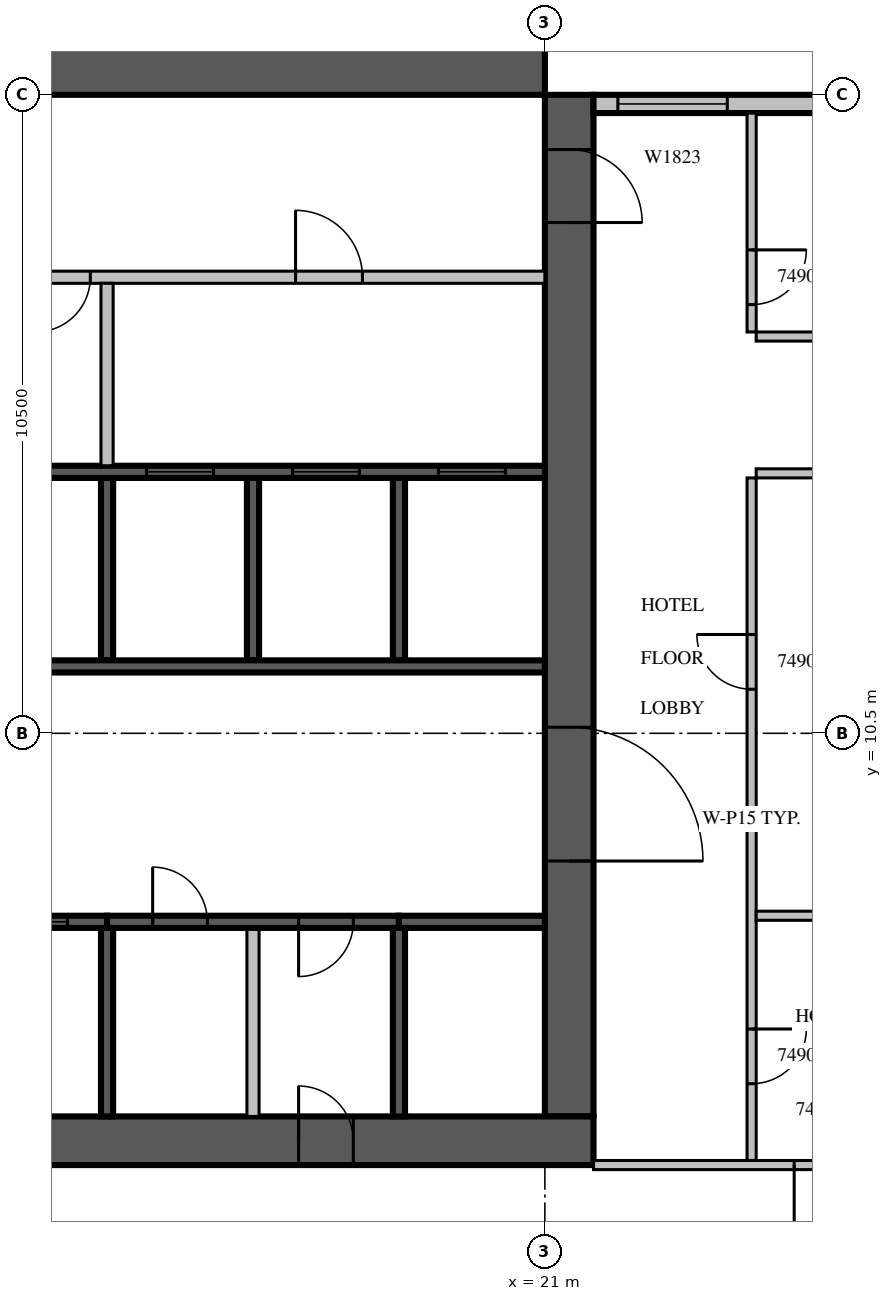
"""IFC4 building model, lengths in metres.
Left out: names, types, materials, properties, quantities, classifications, styles, units other than length and angle.
Written with IfcOpenShell. Run it as: python <this file> out.ifc"""

import sys

from ifc_helpers import new_model, si_unit, direction, frame, frame_2d, origin, place, context, subcontext, project, spatial, rectangle, extrude, source, transform, mapped, element, fill, save


model = new_model("IFC4")
c1 = context("Model", 3, precision=1e-05, world=origin(), true_north=direction((0.0, 1.0)))
c2 = subcontext(c1, "Body", "Model", "MODEL_VIEW")
j1 = project(units=[si_unit("LENGTHUNIT", "METRE"), si_unit("PLANEANGLEUNIT", "RADIAN")], contexts=[c1])
p1 = place(None, origin())
s1 = spatial("IfcSite", under=j1, at=p1, CompositionType="ELEMENT")
p2 = place(p1, origin())
s2 = spatial("IfcBuilding", under=s1, at=p2, CompositionType="ELEMENT")
p3 = place(p2, frame((0.0, 0.0, 219.6)))
s3 = spatial("IfcBuildingStorey", under=s2, at=p3, CompositionType="ELEMENT", Elevation=219.6)
m1 = source(origin(), c2, "Body", "SweptSolid", [
    extrude(rectangle(XDim=16.8, YDim=0.8, at=frame_2d((8.4, 0.0))), origin(), (0.0, 0.0, 1.0), 3.8),
])
p4 = place(p3, frame((21.4, 4.2, 0.0), z_axis=(0.0, 0.0, 1.0), x_axis=(0.0, 1.0, 0.0)))
e1 = element("IfcWall", 1, at=p4, inside=s3, PredefinedType="SHEAR", context=c2, shape_type="MappedRepresentation", body=[
    mapped(m1, transform((0.0, 0.0, 0.0), scale=1.0)),
])
m2 = source(origin(), c2, "Body", "SweptSolid", [
    extrude(rectangle(XDim=2.2, YDim=2.1, at=frame_2d((1.1, 1.05))), frame((0.0, 0.41, 0.0), z_axis=(0.0, -1.0, 0.0), x_axis=(1.0, 0.0, 0.0)), (0.0, 0.0, 1.0), 0.82),
])
p5 = place(p4, frame((4.2, 0.0, 0.0)))
e2 = element("IfcOpeningElement", 2, at=p5, cuts=e1, PredefinedType="OPENING", context=c2, shape_type="MappedRepresentation", body=[
    mapped(m2, transform((0.0, 0.0, 0.0), scale=1.0)),
])
m3 = source(origin(), c2, "Body", "SweptSolid", [
    extrude(rectangle(XDim=1.2, YDim=2.1, at=frame_2d((0.6, 1.05))), frame((0.0, 0.41, 0.0), z_axis=(0.0, -1.0, 0.0), x_axis=(1.0, 0.0, 0.0)), (0.0, 0.0, 1.0), 0.82),
])
p6 = place(p4, frame((14.7, 0.0, 0.0)))
e3 = element("IfcOpeningElement", 3, at=p6, cuts=e1, PredefinedType="OPENING", context=c2, shape_type="MappedRepresentation", body=[
    mapped(m3, transform((0.0, 0.0, 0.0), scale=1.0)),
])
m4 = source(origin(), c2, "Body", "SweptSolid", [
    extrude(rectangle(XDim=17.6, YDim=0.8, at=frame_2d((8.8, 0.0))), origin(), (0.0, 0.0, 1.0), 3.8),
])
p7 = place(p3, frame((4.2, 3.8, 0.0), z_axis=(0.0, 0.0, 1.0), x_axis=(1.0, 0.0, 0.0)))
e4 = element("IfcWall", 4, at=p7, inside=s3, PredefinedType="SHEAR", context=c2, shape_type="MappedRepresentation", body=[
    mapped(m4, transform((0.0, 0.0, 0.0), scale=1.0)),
])
m5 = source(origin(), c2, "Body", "SweptSolid", [
    extrude(rectangle(XDim=0.9, YDim=2.1, at=frame_2d((0.45, 1.05))), frame((0.0, 0.41, 0.0), z_axis=(0.0, -1.0, 0.0), x_axis=(1.0, 0.0, 0.0)), (0.0, 0.0, 1.0), 0.82),
])
p8 = place(p7, frame((12.75, 0.0, 0.0)))
e5 = element("IfcOpeningElement", 5, at=p8, cuts=e4, PredefinedType="OPENING", context=c2, shape_type="MappedRepresentation", body=[
    mapped(m5, transform((0.0, 0.0, 0.0), scale=1.0)),
])
p9 = place(p3, frame((4.2, 21.4, 0.0), z_axis=(0.0, 0.0, 1.0), x_axis=(1.0, 0.0, 0.0)))
e6 = element("IfcWall", 6, at=p9, inside=s3, PredefinedType="SHEAR", context=c2, shape_type="MappedRepresentation", body=[
    mapped(m1, transform((0.0, 0.0, 0.0), scale=1.0)),
])
p10 = place(p9, frame((6.2, 0.0, 0.0)))
e7 = element("IfcOpeningElement", 7, at=p10, cuts=e6, PredefinedType="OPENING", context=c2, shape_type="MappedRepresentation", body=[
    mapped(m3, transform((0.0, 0.0, 0.0), scale=1.0)),
])
m6 = source(origin(), c2, "Body", "SweptSolid", [
    extrude(rectangle(XDim=7.15, YDim=0.3, at=frame_2d((3.575, 0.0))), origin(), (0.0, 0.0, 1.0), 3.4),
])
p11 = place(p3, frame((28.95, 20.85, 0.0), z_axis=(0.0, 0.0, 1.0), x_axis=(-1.0, 0.0, 0.0)))
e8 = element("IfcWall", 8, at=p11, inside=s3, PredefinedType="STANDARD", context=c2, shape_type="MappedRepresentation", body=[
    mapped(m6, transform((0.0, 0.0, 0.0), scale=1.0)),
])
m7 = source(origin(), c2, "Body", "SweptSolid", [
    extrude(rectangle(XDim=3.0, YDim=2.3, at=frame_2d((1.5, 1.15))), frame((0.0, 0.16, 0.0), z_axis=(0.0, -1.0, 0.0), x_axis=(1.0, 0.0, 0.0)), (0.0, 0.0, 1.0), 0.32),
])
p12 = place(p11, frame((0.15, 0.0, 0.6)))
e9 = element("IfcOpeningElement", 9, at=p12, cuts=e8, PredefinedType="OPENING", context=c2, shape_type="MappedRepresentation", body=[
    mapped(m7, transform((0.0, 0.0, 0.0), scale=1.0)),
])
m8 = source(origin(), c2, "Body", "SweptSolid", [
    extrude(rectangle(XDim=1.8, YDim=2.3, at=frame_2d((0.9, 1.15))), frame((0.0, 0.16, 0.0), z_axis=(0.0, -1.0, 0.0), x_axis=(1.0, 0.0, 0.0)), (0.0, 0.0, 1.0), 0.32),
])
p13 = place(p11, frame((4.95, 0.0, 0.6)))
e10 = element("IfcOpeningElement", 10, at=p13, cuts=e8, PredefinedType="OPENING", context=c2, shape_type="MappedRepresentation", body=[
    mapped(m8, transform((0.0, 0.0, 0.0), scale=1.0)),
])
m9 = source(origin(), c2, "Body", "SweptSolid", [
    extrude(rectangle(XDim=3.1, YDim=0.2, at=frame_2d((1.55, 0.0))), origin(), (0.0, 0.0, 1.0), 3.4),
])
for number, where, z_axis, x_axis in (
    (11, (13.8, 4.2, 0.0), (0.0, 0.0, 1.0), (0.0, 1.0, 0.0)),
    (12, (18.6, 4.2, 0.0), (0.0, 0.0, 1.0), (0.0, 1.0, 0.0)),
):
    element("IfcWall", number, at=place(p3, frame(where, z_axis=z_axis, x_axis=x_axis)), inside=s3, PredefinedType="SOLIDWALL", context=c2, shape_type="MappedRepresentation", body=[
        mapped(m9, transform((0.0, 0.0, 0.0), scale=1.0)),
    ])
m10 = source(origin(), c2, "Body", "SweptSolid", [
    extrude(rectangle(XDim=3.1, YDim=0.2, at=frame_2d((1.55, 0.0))), origin(), (0.0, 0.0, 1.0), 3.4),
])
p14 = place(p3, frame((16.2, 4.2, 0.0), z_axis=(0.0, 0.0, 1.0), x_axis=(0.0, 1.0, 0.0)))
e13 = element("IfcWall", 13, at=p14, inside=s3, PredefinedType="PARTITIONING", context=c2, shape_type="MappedRepresentation", body=[
    mapped(m10, transform((0.0, 0.0, 0.0), scale=1.0)),
])
m11 = source(origin(), c2, "Body", "SweptSolid", [
    extrude(rectangle(XDim=3.0, YDim=0.2, at=frame_2d((1.5, 0.0))), origin(), (0.0, 0.0, 1.0), 3.8),
])
for number, where, z_axis, x_axis in (
    (14, (13.8, 11.7, 0.0), (0.0, 0.0, 1.0), (0.0, 1.0, 0.0)),
    (15, (16.2, 11.7, 0.0), (0.0, 0.0, 1.0), (0.0, 1.0, 0.0)),
    (16, (18.6, 11.7, 0.0), (0.0, 0.0, 1.0), (0.0, 1.0, 0.0)),
):
    element("IfcWall", number, at=place(p3, frame(where, z_axis=z_axis, x_axis=x_axis)), inside=s3, PredefinedType="SOLIDWALL", context=c2, shape_type="MappedRepresentation", body=[
        mapped(m11, transform((0.0, 0.0, 0.0), scale=1.0)),
    ])
m12 = source(origin(), c2, "Body", "SweptSolid", [
    extrude(rectangle(XDim=9.6, YDim=0.2, at=frame_2d((4.8, 0.0))), origin(), (0.0, 0.0, 1.0), 3.8),
])
p15 = place(p3, frame((4.2, 7.4, 0.0), z_axis=(0.0, 0.0, 1.0), x_axis=(1.0, 0.0, 0.0)))
e17 = element("IfcWall", 17, at=p15, inside=s3, PredefinedType="SOLIDWALL", context=c2, shape_type="MappedRepresentation", body=[
    mapped(m12, transform((0.0, 0.0, 0.0), scale=1.0)),
])
m13 = source(origin(), c2, "Body", "SweptSolid", [
    extrude(rectangle(XDim=1.1, YDim=2.1, at=frame_2d((0.55, 1.05))), frame((0.0, 0.11, 0.0), z_axis=(0.0, -1.0, 0.0), x_axis=(1.0, 0.0, 0.0)), (0.0, 0.0, 1.0), 0.22),
])
p16 = place(p15, frame((0.65, 0.0, 0.0)))
e18 = element("IfcOpeningElement", 18, at=p16, cuts=e17, PredefinedType="OPENING", context=c2, shape_type="MappedRepresentation", body=[
    mapped(m13, transform((0.0, 0.0, 0.0), scale=1.0)),
])
p17 = place(p15, frame((3.05, 0.0, 0.0)))
e19 = element("IfcOpeningElement", 19, at=p17, cuts=e17, PredefinedType="OPENING", context=c2, shape_type="MappedRepresentation", body=[
    mapped(m13, transform((0.0, 0.0, 0.0), scale=1.0)),
])
p18 = place(p15, frame((5.45, 0.0, 0.0)))
e20 = element("IfcOpeningElement", 20, at=p18, cuts=e17, PredefinedType="OPENING", context=c2, shape_type="MappedRepresentation", body=[
    mapped(m13, transform((0.0, 0.0, 0.0), scale=1.0)),
])
p19 = place(p15, frame((7.85, 0.0, 0.0)))
e21 = element("IfcOpeningElement", 21, at=p19, cuts=e17, PredefinedType="OPENING", context=c2, shape_type="MappedRepresentation", body=[
    mapped(m13, transform((0.0, 0.0, 0.0), scale=1.0)),
])
m14 = source(origin(), c2, "Body", "SweptSolid", [
    extrude(rectangle(XDim=4.8, YDim=0.2, at=frame_2d((2.4, 0.0))), origin(), (0.0, 0.0, 1.0), 3.4),
])
p20 = place(p3, frame((13.8, 7.4, 0.0), z_axis=(0.0, 0.0, 1.0), x_axis=(1.0, 0.0, 0.0)))
e22 = element("IfcWall", 22, at=p20, inside=s3, PredefinedType="SOLIDWALL", context=c2, shape_type="MappedRepresentation", body=[
    mapped(m14, transform((0.0, 0.0, 0.0), scale=1.0)),
])
m15 = source(origin(), c2, "Body", "SweptSolid", [
    extrude(rectangle(XDim=0.9, YDim=2.1, at=frame_2d((0.45, 1.05))), frame((0.0, 0.11, 0.0), z_axis=(0.0, -1.0, 0.0), x_axis=(1.0, 0.0, 0.0)), (0.0, 0.0, 1.0), 0.22),
])
p21 = place(p20, frame((0.75, 0.0, 0.0)))
e23 = element("IfcOpeningElement", 23, at=p21, cuts=e22, PredefinedType="OPENING", context=c2, shape_type="MappedRepresentation", body=[
    mapped(m15, transform((0.0, 0.0, 0.0), scale=1.0)),
])
p22 = place(p20, frame((3.15, 0.0, 0.0)))
e24 = element("IfcOpeningElement", 24, at=p22, cuts=e22, PredefinedType="OPENING", context=c2, shape_type="MappedRepresentation", body=[
    mapped(m15, transform((0.0, 0.0, 0.0), scale=1.0)),
])
m16 = source(origin(), c2, "Body", "SweptSolid", [
    extrude(rectangle(XDim=2.4, YDim=0.2, at=frame_2d((1.2, 0.0))), origin(), (0.0, 0.0, 1.0), 3.8),
])
p23 = place(p3, frame((18.6, 7.4, 0.0), z_axis=(0.0, 0.0, 1.0), x_axis=(1.0, 0.0, 0.0)))
e25 = element("IfcWall", 25, at=p23, inside=s3, PredefinedType="SOLIDWALL", context=c2, shape_type="MappedRepresentation", body=[
    mapped(m16, transform((0.0, 0.0, 0.0), scale=1.0)),
])
p24 = place(p3, frame((11.4, 11.6, 0.0), z_axis=(0.0, 0.0, 1.0), x_axis=(1.0, 0.0, 0.0)))
e26 = element("IfcWall", 26, at=p24, inside=s3, PredefinedType="SOLIDWALL", context=c2, shape_type="MappedRepresentation", body=[
    mapped(m12, transform((0.0, 0.0, 0.0), scale=1.0)),
])
p25 = place(p3, frame((11.4, 14.8, 0.0), z_axis=(0.0, 0.0, 1.0), x_axis=(1.0, 0.0, 0.0)))
e27 = element("IfcWall", 27, at=p25, inside=s3, PredefinedType="SOLIDWALL", context=c2, shape_type="MappedRepresentation", body=[
    mapped(m12, transform((0.0, 0.0, 0.0), scale=1.0)),
])
p26 = place(p25, frame((3.05, 0.0, 0.0)))
e28 = element("IfcOpeningElement", 28, at=p26, cuts=e27, PredefinedType="OPENING", context=c2, shape_type="MappedRepresentation", body=[
    mapped(m13, transform((0.0, 0.0, 0.0), scale=1.0)),
])
p27 = place(p25, frame((5.45, 0.0, 0.0)))
e29 = element("IfcOpeningElement", 29, at=p27, cuts=e27, PredefinedType="OPENING", context=c2, shape_type="MappedRepresentation", body=[
    mapped(m13, transform((0.0, 0.0, 0.0), scale=1.0)),
])
p28 = place(p25, frame((7.85, 0.0, 0.0)))
e30 = element("IfcOpeningElement", 30, at=p28, cuts=e27, PredefinedType="OPENING", context=c2, shape_type="MappedRepresentation", body=[
    mapped(m13, transform((0.0, 0.0, 0.0), scale=1.0)),
])
m17 = source(origin(), c2, "Body", "SweptSolid", [
    extrude(rectangle(XDim=11.45, YDim=0.2, at=frame_2d((5.725, 0.0))), origin(), (0.0, 0.0, 1.0), 3.4),
])
p29 = place(p3, frame((9.55, 18.0, 0.0), z_axis=(0.0, 0.0, 1.0), x_axis=(1.0, 0.0, 0.0)))
e31 = element("IfcWall", 31, at=p29, inside=s3, PredefinedType="PARTITIONING", context=c2, shape_type="MappedRepresentation", body=[
    mapped(m17, transform((0.0, 0.0, 0.0), scale=1.0)),
])
p30 = place(p29, frame((0.375, 0.0, 0.0)))
e32 = element("IfcOpeningElement", 32, at=p30, cuts=e31, PredefinedType="OPENING", context=c2, shape_type="MappedRepresentation", body=[
    mapped(m15, transform((0.0, 0.0, 0.0), scale=1.0)),
])
p31 = place(p29, frame((1.7, 0.0, 0.0)))
e33 = element("IfcOpeningElement", 33, at=p31, cuts=e31, PredefinedType="OPENING", context=c2, shape_type="MappedRepresentation", body=[
    mapped(m15, transform((0.0, 0.0, 0.0), scale=1.0)),
])
p32 = place(p29, frame((3.075, 0.0, 0.0)))
e34 = element("IfcOpeningElement", 34, at=p32, cuts=e31, PredefinedType="OPENING", context=c2, shape_type="MappedRepresentation", body=[
    mapped(m15, transform((0.0, 0.0, 0.0), scale=1.0)),
])
p33 = place(p29, frame((7.35, 0.0, 0.0)))
e35 = element("IfcOpeningElement", 35, at=p33, cuts=e31, PredefinedType="OPENING", context=c2, shape_type="MappedRepresentation", body=[
    mapped(m13, transform((0.0, 0.0, 0.0), scale=1.0)),
])
m18 = source(origin(), c2, "Body", "SweptSolid", [
    extrude(rectangle(XDim=3.0, YDim=0.2, at=frame_2d((1.5, 0.0))), origin(), (0.0, 0.0, 1.0), 3.4),
])
p34 = place(p3, frame((13.8, 14.9, 0.0), z_axis=(0.0, 0.0, 1.0), x_axis=(0.0, 1.0, 0.0)))
e36 = element("IfcWall", 36, at=p34, inside=s3, PredefinedType="PARTITIONING", context=c2, shape_type="MappedRepresentation", body=[
    mapped(m18, transform((0.0, 0.0, 0.0), scale=1.0)),
])
m19 = source(origin(), c2, "Body", "SweptSolid", [
    extrude(rectangle(XDim=11.225, YDim=0.15, at=frame_2d((5.612, 0.0))), origin(), (0.0, 0.0, 1.0), 3.4),
])
p35 = place(p3, frame((24.4, 14.7, 0.0), z_axis=(0.0, 0.0, 1.0), x_axis=(0.0, -1.0, 0.0)))
e37 = element("IfcWall", 37, at=p35, inside=s3, PredefinedType="PARTITIONING", context=c2, shape_type="MappedRepresentation", body=[
    mapped(m19, transform((0.0, 0.0, 0.0), scale=1.0)),
])
m20 = source(origin(), c2, "Body", "SweptSolid", [
    extrude(rectangle(XDim=0.9, YDim=2.1, at=frame_2d((0.45, 1.05))), frame((0.0, 0.085, 0.0), z_axis=(0.0, -1.0, 0.0), x_axis=(1.0, 0.0, 0.0)), (0.0, 0.0, 1.0), 0.17),
])
p36 = place(p35, frame((9.062, 0.0, 0.0)))
e38 = element("IfcOpeningElement", 38, at=p36, cuts=e37, PredefinedType="OPENING", context=c2, shape_type="MappedRepresentation", body=[
    mapped(m20, transform((0.0, 0.0, 0.0), scale=1.0)),
])
p37 = place(p35, frame((2.575, 0.0, 0.0)))
e39 = element("IfcOpeningElement", 39, at=p37, cuts=e37, PredefinedType="OPENING", context=c2, shape_type="MappedRepresentation", body=[
    mapped(m20, transform((0.0, 0.0, 0.0), scale=1.0)),
])
m21 = source(origin(), c2, "Body", "SweptSolid", [
    extrude(rectangle(XDim=3.6, YDim=0.15, at=frame_2d((1.8, 0.0))), origin(), (0.0, 0.0, 1.0), 3.4),
])
p38 = place(p3, frame((24.4, 20.7, 0.0), z_axis=(0.0, 0.0, 1.0), x_axis=(0.0, -1.0, 0.0)))
e40 = element("IfcWall", 40, at=p38, inside=s3, PredefinedType="PARTITIONING", context=c2, shape_type="MappedRepresentation", body=[
    mapped(m21, transform((0.0, 0.0, 0.0), scale=1.0)),
])
p39 = place(p38, frame((2.25, 0.0, 0.0)))
e41 = element("IfcOpeningElement", 41, at=p39, cuts=e40, PredefinedType="OPENING", context=c2, shape_type="MappedRepresentation", body=[
    mapped(m20, transform((0.0, 0.0, 0.0), scale=1.0)),
])
m22 = source(origin(), c2, "Body", "SweptSolid", [
    extrude(rectangle(XDim=4.85, YDim=0.15, at=frame_2d((2.425, 0.0))), origin(), (0.0, 0.0, 1.0), 3.4),
])
for number, where, z_axis, x_axis in (
    (42, (29.325, 7.5, 0.0), (0.0, 0.0, 1.0), (-1.0, 0.0, 0.0)),
    (43, (29.325, 14.775, 0.0), (0.0, 0.0, 1.0), (-1.0, 0.0, 0.0)),
    (44, (24.475, 17.025, 0.0), (0.0, 0.0, 1.0), (1.0, 0.0, 0.0)),
):
    element("IfcWall", number, at=place(p3, frame(where, z_axis=z_axis, x_axis=x_axis)), inside=s3, PredefinedType="PARTITIONING", context=c2, shape_type="MappedRepresentation", body=[
        mapped(m22, transform((0.0, 0.0, 0.0), scale=1.0)),
    ])
m23 = source(origin(), c2, "Body", "SweptSolid", [
    extrude(rectangle(XDim=7.525, YDim=0.15, at=frame_2d((3.763, 0.0))), origin(), (0.0, 0.0, 1.0), 3.4),
])
p40 = place(p3, frame((21.8, 3.4, 0.0), z_axis=(0.0, 0.0, 1.0), x_axis=(1.0, 0.0, 0.0)))
e45 = element("IfcWall", 45, at=p40, inside=s3, PredefinedType="PARTITIONING", context=c2, shape_type="MappedRepresentation", body=[
    mapped(m23, transform((0.0, 0.0, 0.0), scale=1.0)),
])
m24 = source(origin(), c2, "Body", "SweptSolid", [
    extrude(rectangle(XDim=1.0, YDim=2.1, at=frame_2d((0.5, 1.05))), frame((0.0, 0.085, 0.0), z_axis=(0.0, -1.0, 0.0), x_axis=(1.0, 0.0, 0.0)), (0.0, 0.0, 1.0), 0.17),
])
p41 = place(p40, frame((3.3, 0.0, 0.0)))
e46 = element("IfcOpeningElement", 46, at=p41, cuts=e45, PredefinedType="OPENING", context=c2, shape_type="MappedRepresentation", body=[
    mapped(m24, transform((0.0, 0.0, 0.0), scale=1.0)),
])
p42 = place(p40, frame((4.363, 0.0, 0.0)))
e47 = element("IfcOpeningElement", 47, at=p42, cuts=e45, PredefinedType="OPENING", context=c2, shape_type="MappedRepresentation", body=[
    mapped(m20, transform((0.0, 0.0, 0.0), scale=1.0)),
])
m25 = source(origin(), c2, "Body", "SweptSolid", [
    extrude(rectangle(XDim=1.8, YDim=2.3, at=frame_2d((0.9, 1.15))), frame((0.0, 0.03, 0.0), z_axis=(0.0, -1.0, 0.0), x_axis=(1.0, 0.0, 0.0)), (0.0, 0.0, 1.0), 0.06),
])
p43 = place(p13, origin())
e48 = element("IfcWindow", 48, at=p43, inside=s3, PartitioningType="SINGLE_PANEL", PredefinedType="WINDOW", context=c2, shape_type="MappedRepresentation", body=[
    mapped(m25, transform((0.0, 0.0, 0.0), scale=1.0)),
])
fill(e10, e48)
m26 = source(origin(), c2, "Body", "SweptSolid", [
    extrude(rectangle(XDim=1.1, YDim=2.1, at=frame_2d((0.55, 1.05))), frame((0.0, 0.025, 0.0), z_axis=(0.0, -1.0, 0.0), x_axis=(1.0, 0.0, 0.0)), (0.0, 0.0, 1.0), 0.05),
])
p44 = place(p19, origin())
e49 = element("IfcDoor", 49, at=p44, inside=s3, OperationType="SLIDING_TO_LEFT", PredefinedType="DOOR", context=c2, shape_type="MappedRepresentation", body=[
    mapped(m26, transform((0.0, 0.0, 0.0), scale=1.0)),
])
fill(e21, e49)
m27 = source(origin(), c2, "Body", "SweptSolid", [
    extrude(rectangle(XDim=0.9, YDim=2.1, at=frame_2d((0.45, 1.05))), frame((0.0, 0.025, 0.0), z_axis=(0.0, -1.0, 0.0), x_axis=(1.0, 0.0, 0.0)), (0.0, 0.0, 1.0), 0.05),
])
p45 = place(p21, origin())
e50 = element("IfcDoor", 50, at=p45, inside=s3, OperationType="SINGLE_SWING_LEFT", PredefinedType="DOOR", context=c2, shape_type="MappedRepresentation", body=[
    mapped(m27, transform((0.0, 0.0, 0.0), scale=1.0)),
])
fill(e23, e50)
p46 = place(p22, origin())
e51 = element("IfcDoor", 51, at=p46, inside=s3, OperationType="SINGLE_SWING_RIGHT", PredefinedType="DOOR", context=c2, shape_type="MappedRepresentation", body=[
    mapped(m27, transform((0.0, 0.0, 0.0), scale=1.0)),
])
fill(e24, e51)
p47 = place(p26, origin())
e52 = element("IfcDoor", 52, at=p47, inside=s3, OperationType="SLIDING_TO_LEFT", PredefinedType="DOOR", context=c2, shape_type="MappedRepresentation", body=[
    mapped(m26, transform((0.0, 0.0, 0.0), scale=1.0)),
])
fill(e28, e52)
p48 = place(p27, origin())
e53 = element("IfcDoor", 53, at=p48, inside=s3, OperationType="SLIDING_TO_LEFT", PredefinedType="DOOR", context=c2, shape_type="MappedRepresentation", body=[
    mapped(m26, transform((0.0, 0.0, 0.0), scale=1.0)),
])
fill(e29, e53)
p49 = place(p28, origin())
e54 = element("IfcDoor", 54, at=p49, inside=s3, OperationType="SLIDING_TO_LEFT", PredefinedType="DOOR", context=c2, shape_type="MappedRepresentation", body=[
    mapped(m26, transform((0.0, 0.0, 0.0), scale=1.0)),
])
fill(e30, e54)
p50 = place(p32, origin())
e55 = element("IfcDoor", 55, at=p50, inside=s3, OperationType="SINGLE_SWING_RIGHT", PredefinedType="DOOR", context=c2, shape_type="MappedRepresentation", body=[
    mapped(m27, transform((0.0, 0.0, 0.0), scale=1.0)),
])
fill(e34, e55)
p51 = place(p33, origin())
e56 = element("IfcDoor", 56, at=p51, inside=s3, OperationType="SINGLE_SWING_LEFT", PredefinedType="DOOR", context=c2, shape_type="MappedRepresentation", body=[
    mapped(m26, transform((0.0, 0.0, 0.0), scale=1.0)),
])
fill(e35, e56)
m28 = source(origin(), c2, "Body", "SweptSolid", [
    extrude(rectangle(XDim=2.2, YDim=2.1, at=frame_2d((1.1, 1.05))), frame((0.0, 0.025, 0.0), z_axis=(0.0, -1.0, 0.0), x_axis=(1.0, 0.0, 0.0)), (0.0, 0.0, 1.0), 0.05),
])
p52 = place(p5, origin())
e57 = element("IfcDoor", 57, at=p52, inside=s3, OperationType="DOUBLE_DOOR_SINGLE_SWING", PredefinedType="DOOR", context=c2, shape_type="MappedRepresentation", body=[
    mapped(m28, transform((0.0, 0.0, 0.0), scale=1.0)),
])
fill(e2, e57)
m29 = source(origin(), c2, "Body", "SweptSolid", [
    extrude(rectangle(XDim=1.2, YDim=2.1, at=frame_2d((0.6, 1.05))), frame((0.0, 0.025, 0.0), z_axis=(0.0, -1.0, 0.0), x_axis=(1.0, 0.0, 0.0)), (0.0, 0.0, 1.0), 0.05),
])
p53 = place(p6, origin())
e58 = element("IfcDoor", 58, at=p53, inside=s3, OperationType="SINGLE_SWING_RIGHT", PredefinedType="DOOR", context=c2, shape_type="MappedRepresentation", body=[
    mapped(m29, transform((0.0, 0.0, 0.0), scale=1.0)),
])
fill(e3, e58)
p54 = place(p8, origin())
e59 = element("IfcDoor", 59, at=p54, inside=s3, OperationType="SINGLE_SWING_LEFT", PredefinedType="DOOR", context=c2, shape_type="MappedRepresentation", body=[
    mapped(m27, transform((0.0, 0.0, 0.0), scale=1.0)),
])
fill(e5, e59)
p55 = place(p36, origin())
e60 = element("IfcDoor", 60, at=p55, inside=s3, OperationType="SINGLE_SWING_LEFT", PredefinedType="DOOR", context=c2, shape_type="MappedRepresentation", body=[
    mapped(m27, transform((0.0, 0.0, 0.0), scale=1.0)),
])
fill(e38, e60)
p56 = place(p37, origin())
e61 = element("IfcDoor", 61, at=p56, inside=s3, OperationType="SINGLE_SWING_RIGHT", PredefinedType="DOOR", context=c2, shape_type="MappedRepresentation", body=[
    mapped(m27, transform((0.0, 0.0, 0.0), scale=1.0)),
])
fill(e39, e61)
p57 = place(p39, origin())
e62 = element("IfcDoor", 62, at=p57, inside=s3, OperationType="SINGLE_SWING_LEFT", PredefinedType="DOOR", context=c2, shape_type="MappedRepresentation", body=[
    mapped(m27, transform((0.0, 0.0, 0.0), scale=1.0)),
])
fill(e41, e62)
m30 = source(origin(), c2, "Body", "SweptSolid", [
    extrude(rectangle(XDim=1.0, YDim=2.1, at=frame_2d((0.5, 1.05))), frame((0.0, 0.025, 0.0), z_axis=(0.0, -1.0, 0.0), x_axis=(1.0, 0.0, 0.0)), (0.0, 0.0, 1.0), 0.05),
])
p58 = place(p41, origin())
e63 = element("IfcDoor", 63, at=p58, inside=s3, OperationType="SINGLE_SWING_RIGHT", PredefinedType="DOOR", context=c2, shape_type="MappedRepresentation", body=[
    mapped(m30, transform((0.0, 0.0, 0.0), scale=1.0)),
])
fill(e46, e63)
save(model, sys.argv[1])
